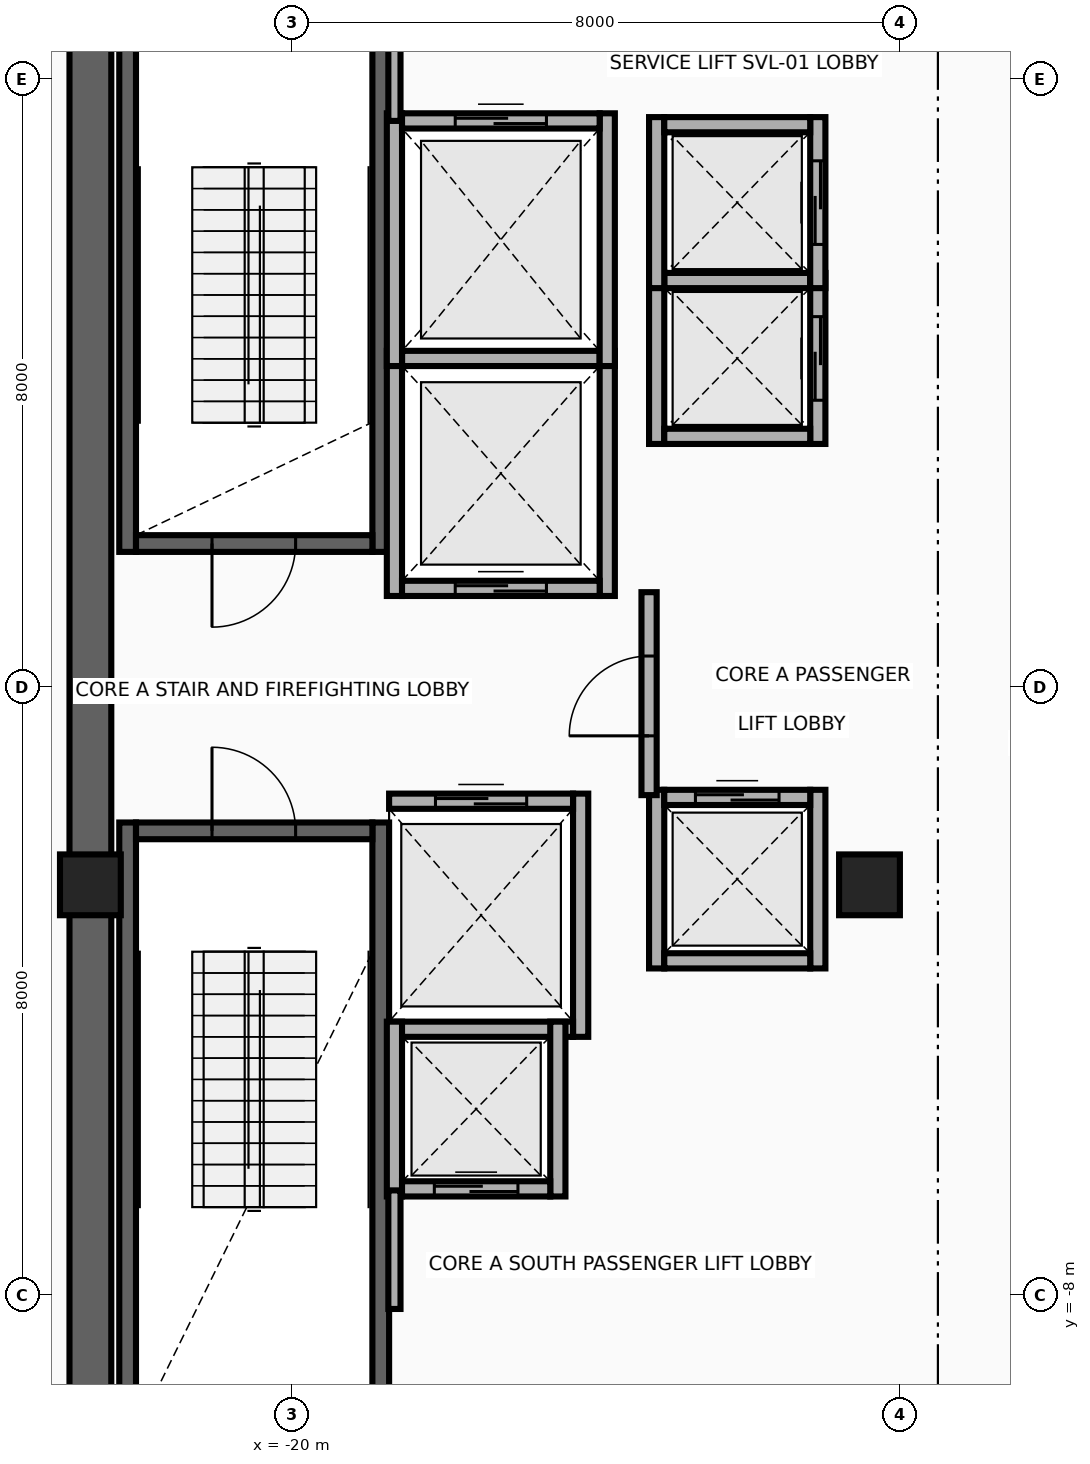
"""IFC4 building model, lengths in metres.
Left out: names, types, materials, properties, quantities, classifications, styles, units other than length and angle.
Written with IfcOpenShell. Run it as: python <this file> out.ifc"""

import sys

from ifc_helpers import new_model, si_unit, direction, frame, frame_2d, origin, origin_2d, place, context, subcontext, project, spatial, rectangle, extrude, source, transform, mapped, element, fill, save


model = new_model("IFC4")
c1 = context("Model", 3, precision=1e-05, world=origin(), true_north=direction((0.0, 1.0)))
c2 = subcontext(c1, "Body", "Model", "MODEL_VIEW")
j1 = project(units=[si_unit("LENGTHUNIT", "METRE"), si_unit("PLANEANGLEUNIT", "RADIAN")], contexts=[c1])
p1 = place(None, origin())
s1 = spatial("IfcSite", under=j1, at=p1, CompositionType="ELEMENT")
p2 = place(p1, origin())
s2 = spatial("IfcBuilding", under=s1, at=p2, CompositionType="ELEMENT")
p3 = place(p2, frame((0.0, 0.0, 261.5)))
s3 = spatial("IfcBuildingStorey", under=s2, at=p3, CompositionType="ELEMENT", Elevation=261.5)
for number, where, z_axis, x_axis in (
    (1, (-22.16, 1.78, 0.0), (0.0, 0.0, 1.0), (0.0, 1.0, 0.0)),
    (2, (-18.83, 1.78, 0.0), (0.0, 0.0, 1.0), (0.0, 1.0, 0.0)),
):
    element("IfcWall", number, at=place(p3, frame(where, z_axis=z_axis, x_axis=x_axis)), inside=s3, PredefinedType="SHEAR", context=c2, shape_type="SweptSolid", body=[
        extrude(rectangle(XDim=8.745, YDim=0.22, at=frame_2d((4.373, 0.0))), origin(), (0.0, 0.0, 1.0), 4.26),
    ])
p4 = place(p3, frame((-22.05, 1.89, 0.0), z_axis=(0.0, 0.0, 1.0), x_axis=(1.0, 0.0, 0.0)))
e3 = element("IfcWall", 3, at=p4, inside=s3, PredefinedType="SHEAR", context=c2, shape_type="SweptSolid", body=[
    extrude(rectangle(XDim=3.11, YDim=0.22, at=frame_2d((1.555, 0.0))), origin(), (0.0, 0.0, 1.0), 4.26),
])
p5 = place(p4, frame((1.0, 0.0, 0.0)))
e4 = element("IfcOpeningElement", 4, at=p5, cuts=e3, PredefinedType="OPENING", context=c2, shape_type="SweptSolid", body=[
    extrude(rectangle(XDim=1.1, YDim=2.15, at=frame_2d((0.55, 1.075))), frame((0.0, 0.125, 0.0), z_axis=(0.0, -1.0, 0.0), x_axis=(1.0, 0.0, 0.0)), (0.0, 0.0, 1.0), 0.25),
])
for number, where, z_axis, x_axis in (
    (5, (-22.16, -10.525, 0.0), (0.0, 0.0, 1.0), (0.0, 1.0, 0.0)),
    (6, (-18.83, -10.525, 0.0), (0.0, 0.0, 1.0), (0.0, 1.0, 0.0)),
):
    element("IfcWall", number, at=place(p3, frame(where, z_axis=z_axis, x_axis=x_axis)), inside=s3, PredefinedType="SHEAR", context=c2, shape_type="SweptSolid", body=[
        extrude(rectangle(XDim=8.745, YDim=0.22, at=frame_2d((4.373, 0.0))), origin(), (0.0, 0.0, 1.0), 4.26),
    ])
p6 = place(p3, frame((-22.05, -1.89, 0.0), z_axis=(0.0, 0.0, 1.0), x_axis=(1.0, 0.0, 0.0)))
e7 = element("IfcWall", 7, at=p6, inside=s3, PredefinedType="SHEAR", context=c2, shape_type="SweptSolid", body=[
    extrude(rectangle(XDim=3.11, YDim=0.22, at=frame_2d((1.555, 0.0))), origin(), (0.0, 0.0, 1.0), 4.26),
])
p7 = place(p6, frame((1.0, 0.0, 0.0)))
e8 = element("IfcOpeningElement", 8, at=p7, cuts=e7, PredefinedType="OPENING", context=c2, shape_type="SweptSolid", body=[
    extrude(rectangle(XDim=1.1, YDim=2.15, at=frame_2d((0.55, 1.075))), frame((0.0, 0.125, 0.0), z_axis=(0.0, -1.0, 0.0), x_axis=(1.0, 0.0, 0.0)), (0.0, 0.0, 1.0), 0.25),
])
p8 = place(p3, frame((-22.65, -11.075, 0.0), z_axis=(0.0, 0.0, 1.0), x_axis=(0.0, 1.0, 0.0)))
e9 = element("IfcWall", 9, at=p8, inside=s3, PredefinedType="SHEAR", context=c2, shape_type="SweptSolid", body=[
    extrude(rectangle(XDim=22.15, YDim=0.55, at=frame_2d((11.075, 0.0))), origin(), (0.0, 0.0, 1.0), 4.26),
])
m1 = source(origin(), c2, "Body", "SweptSolid", [
    extrude(rectangle(XDim=0.8, YDim=0.8, at=origin_2d()), origin(), (0.0, 0.0, 1.0), 4.5),
])
for number, where, z_axis, x_axis in (
    (10, (-22.65, -2.6, 0.0), (0.0, 0.0, 1.0), (1.0, 0.0, 0.0)),
    (11, (-12.4, -2.6, 0.0), (0.0, 0.0, 1.0), (1.0, 0.0, 0.0)),
):
    element("IfcColumn", number, at=place(p3, frame(where, z_axis=z_axis, x_axis=x_axis)), inside=s3, PredefinedType="COLUMN", context=c2, shape_type="MappedRepresentation", body=[
        mapped(m1, transform((0.0, 0.0, 0.0), x_axis=(1.0, 0.0, 0.0), y_axis=(0.0, 1.0, 0.0), z_axis=(0.0, 0.0, 1.0), scale=1.0)),
    ])
for number, where, z_axis, x_axis in (
    (12, (-18.65, 1.2, 0.0), (0.0, 0.0, 1.0), (0.0, 1.0, 0.0)),
    (13, (-15.85, 1.2, 0.0), (0.0, 0.0, 1.0), (0.0, 1.0, 0.0)),
):
    element("IfcWall", number, at=place(p3, frame(where, z_axis=z_axis, x_axis=x_axis)), inside=s3, PredefinedType="MOVABLE", context=c2, shape_type="SweptSolid", body=[
        extrude(rectangle(XDim=3.225, YDim=0.2, at=frame_2d((1.613, 0.0))), origin(), (0.0, 0.0, 1.0), 4.26),
    ])
p9 = place(p3, frame((-18.55, 1.3, 0.0), z_axis=(0.0, 0.0, 1.0), x_axis=(1.0, 0.0, 0.0)))
e14 = element("IfcWall", 14, at=p9, inside=s3, PredefinedType="MOVABLE", context=c2, shape_type="SweptSolid", body=[
    extrude(rectangle(XDim=2.6, YDim=0.2, at=frame_2d((1.3, 0.0))), origin(), (0.0, 0.0, 1.0), 4.26),
])
p10 = place(p9, frame((0.7, 0.0, 0.0)))
e15 = element("IfcOpeningElement", 15, at=p10, cuts=e14, PredefinedType="OPENING", context=c2, shape_type="SweptSolid", body=[
    extrude(rectangle(XDim=1.2, YDim=2.1, at=frame_2d((0.6, 1.05))), frame((0.0, 0.115, 0.0), z_axis=(0.0, -1.0, 0.0), x_axis=(1.0, 0.0, 0.0)), (0.0, 0.0, 1.0), 0.23),
])
p11 = place(p3, frame((-18.55, 4.325, 0.0), z_axis=(0.0, 0.0, 1.0), x_axis=(1.0, 0.0, 0.0)))
e16 = element("IfcWall", 16, at=p11, inside=s3, PredefinedType="MOVABLE", context=c2, shape_type="SweptSolid", body=[
    extrude(rectangle(XDim=2.6, YDim=0.2, at=frame_2d((1.3, 0.0))), origin(), (0.0, 0.0, 1.0), 4.26),
])
p12 = place(p3, frame((-16.2, -4.6, 0.0), z_axis=(0.0, 0.0, 1.0), x_axis=(0.0, 1.0, 0.0)))
e17 = element("IfcWall", 17, at=p12, inside=s3, PredefinedType="MOVABLE", context=c2, shape_type="SweptSolid", body=[
    extrude(rectangle(XDim=3.2, YDim=0.2, at=frame_2d((1.6, 0.0))), origin(), (0.0, 0.0, 1.0), 4.26),
])
p13 = place(p3, frame((-18.72, -4.5, 0.0), z_axis=(0.0, 0.0, 1.0), x_axis=(1.0, 0.0, 0.0)))
e18 = element("IfcWall", 18, at=p13, inside=s3, PredefinedType="MOVABLE", context=c2, shape_type="SweptSolid", body=[
    extrude(rectangle(XDim=2.42, YDim=0.2, at=frame_2d((1.21, 0.0))), origin(), (0.0, 0.0, 1.0), 4.26),
])
p14 = place(p3, frame((-18.72, -1.5, 0.0), z_axis=(0.0, 0.0, 1.0), x_axis=(1.0, 0.0, 0.0)))
e19 = element("IfcWall", 19, at=p14, inside=s3, PredefinedType="MOVABLE", context=c2, shape_type="SweptSolid", body=[
    extrude(rectangle(XDim=2.42, YDim=0.2, at=frame_2d((1.21, 0.0))), origin(), (0.0, 0.0, 1.0), 4.26),
])
p15 = place(p14, frame((0.61, 0.0, 0.0)))
e20 = element("IfcOpeningElement", 20, at=p15, cuts=e19, PredefinedType="OPENING", context=c2, shape_type="SweptSolid", body=[
    extrude(rectangle(XDim=1.2, YDim=2.1, at=frame_2d((0.6, 1.05))), frame((0.0, 0.115, 0.0), z_axis=(0.0, -1.0, 0.0), x_axis=(1.0, 0.0, 0.0)), (0.0, 0.0, 1.0), 0.23),
])
for number, where, z_axis, x_axis in (
    (21, (-18.65, 4.225, 0.0), (0.0, 0.0, 1.0), (0.0, 1.0, 0.0)),
    (22, (-15.85, 4.225, 0.0), (0.0, 0.0, 1.0), (0.0, 1.0, 0.0)),
):
    element("IfcWall", number, at=place(p3, frame(where, z_axis=z_axis, x_axis=x_axis)), inside=s3, PredefinedType="MOVABLE", context=c2, shape_type="SweptSolid", body=[
        extrude(rectangle(XDim=3.325, YDim=0.2, at=frame_2d((1.663, 0.0))), origin(), (0.0, 0.0, 1.0), 4.26),
    ])
p16 = place(p3, frame((-18.55, 7.45, 0.0), z_axis=(0.0, 0.0, 1.0), x_axis=(1.0, 0.0, 0.0)))
e23 = element("IfcWall", 23, at=p16, inside=s3, PredefinedType="MOVABLE", context=c2, shape_type="SweptSolid", body=[
    extrude(rectangle(XDim=2.6, YDim=0.2, at=frame_2d((1.3, 0.0))), origin(), (0.0, 0.0, 1.0), 4.26),
])
p17 = place(p16, frame((0.7, 0.0, 0.0)))
e24 = element("IfcOpeningElement", 24, at=p17, cuts=e23, PredefinedType="OPENING", context=c2, shape_type="SweptSolid", body=[
    extrude(rectangle(XDim=1.2, YDim=2.1, at=frame_2d((0.6, 1.05))), frame((0.0, 0.115, 0.0), z_axis=(0.0, -1.0, 0.0), x_axis=(1.0, 0.0, 0.0)), (0.0, 0.0, 1.0), 0.23),
])
p18 = place(p3, frame((-15.2, 3.2, 0.0), z_axis=(0.0, 0.0, 1.0), x_axis=(0.0, 1.0, 0.0)))
e25 = element("IfcWall", 25, at=p18, inside=s3, PredefinedType="MOVABLE", context=c2, shape_type="SweptSolid", body=[
    extrude(rectangle(XDim=2.25, YDim=0.2, at=frame_2d((1.125, 0.0))), origin(), (0.0, 0.0, 1.0), 4.26),
])
p19 = place(p3, frame((-13.08, 3.2, 0.0), z_axis=(0.0, 0.0, 1.0), x_axis=(0.0, 1.0, 0.0)))
e26 = element("IfcWall", 26, at=p19, inside=s3, PredefinedType="MOVABLE", context=c2, shape_type="SweptSolid", body=[
    extrude(rectangle(XDim=2.25, YDim=0.2, at=frame_2d((1.125, 0.0))), origin(), (0.0, 0.0, 1.0), 4.26),
])
p20 = place(p19, frame((0.575, 0.0, 0.0)))
e27 = element("IfcOpeningElement", 27, at=p20, cuts=e26, PredefinedType="OPENING", context=c2, shape_type="SweptSolid", body=[
    extrude(rectangle(XDim=1.1, YDim=2.1, at=frame_2d((0.55, 1.05))), frame((0.0, 0.115, 0.0), z_axis=(0.0, -1.0, 0.0), x_axis=(1.0, 0.0, 0.0)), (0.0, 0.0, 1.0), 0.23),
])
for number, where, z_axis, x_axis in (
    (28, (-15.1, 3.3, 0.0), (0.0, 0.0, 1.0), (1.0, 0.0, 0.0)),
    (29, (-15.1, 5.35, 0.0), (0.0, 0.0, 1.0), (1.0, 0.0, 0.0)),
):
    element("IfcWall", number, at=place(p3, frame(where, z_axis=z_axis, x_axis=x_axis)), inside=s3, PredefinedType="MOVABLE", context=c2, shape_type="SweptSolid", body=[
        extrude(rectangle(XDim=1.92, YDim=0.2, at=frame_2d((0.96, 0.0))), origin(), (0.0, 0.0, 1.0), 4.26),
    ])
p21 = place(p3, frame((-15.2, 5.25, 0.0), z_axis=(0.0, 0.0, 1.0), x_axis=(0.0, 1.0, 0.0)))
e30 = element("IfcWall", 30, at=p21, inside=s3, PredefinedType="MOVABLE", context=c2, shape_type="SweptSolid", body=[
    extrude(rectangle(XDim=2.25, YDim=0.2, at=frame_2d((1.125, 0.0))), origin(), (0.0, 0.0, 1.0), 4.26),
])
p22 = place(p3, frame((-13.08, 5.25, 0.0), z_axis=(0.0, 0.0, 1.0), x_axis=(0.0, 1.0, 0.0)))
e31 = element("IfcWall", 31, at=p22, inside=s3, PredefinedType="MOVABLE", context=c2, shape_type="SweptSolid", body=[
    extrude(rectangle(XDim=2.25, YDim=0.2, at=frame_2d((1.125, 0.0))), origin(), (0.0, 0.0, 1.0), 4.26),
])
p23 = place(p22, frame((0.575, 0.0, 0.0)))
e32 = element("IfcOpeningElement", 32, at=p23, cuts=e31, PredefinedType="OPENING", context=c2, shape_type="SweptSolid", body=[
    extrude(rectangle(XDim=1.1, YDim=2.1, at=frame_2d((0.55, 1.05))), frame((0.0, 0.115, 0.0), z_axis=(0.0, -1.0, 0.0), x_axis=(1.0, 0.0, 0.0)), (0.0, 0.0, 1.0), 0.23),
])
p24 = place(p3, frame((-15.1, 7.4, 0.0), z_axis=(0.0, 0.0, 1.0), x_axis=(1.0, 0.0, 0.0)))
e33 = element("IfcWall", 33, at=p24, inside=s3, PredefinedType="MOVABLE", context=c2, shape_type="SweptSolid", body=[
    extrude(rectangle(XDim=1.92, YDim=0.2, at=frame_2d((0.96, 0.0))), origin(), (0.0, 0.0, 1.0), 4.26),
])
for number, where, z_axis, x_axis in (
    (34, (-18.65, -6.7, 0.0), (0.0, 0.0, 1.0), (0.0, 1.0, 0.0)),
    (35, (-16.5, -6.7, 0.0), (0.0, 0.0, 1.0), (0.0, 1.0, 0.0)),
):
    element("IfcWall", number, at=place(p3, frame(where, z_axis=z_axis, x_axis=x_axis)), inside=s3, PredefinedType="MOVABLE", context=c2, shape_type="SweptSolid", body=[
        extrude(rectangle(XDim=2.3, YDim=0.2, at=frame_2d((1.15, 0.0))), origin(), (0.0, 0.0, 1.0), 4.26),
    ])
p25 = place(p3, frame((-18.55, -6.6, 0.0), z_axis=(0.0, 0.0, 1.0), x_axis=(1.0, 0.0, 0.0)))
e36 = element("IfcWall", 36, at=p25, inside=s3, PredefinedType="MOVABLE", context=c2, shape_type="SweptSolid", body=[
    extrude(rectangle(XDim=1.95, YDim=0.2, at=frame_2d((0.975, 0.0))), origin(), (0.0, 0.0, 1.0), 4.26),
])
p26 = place(p25, frame((0.425, 0.0, 0.0)))
e37 = element("IfcOpeningElement", 37, at=p26, cuts=e36, PredefinedType="OPENING", context=c2, shape_type="SweptSolid", body=[
    extrude(rectangle(XDim=1.1, YDim=2.1, at=frame_2d((0.55, 1.05))), frame((0.0, 0.115, 0.0), z_axis=(0.0, -1.0, 0.0), x_axis=(1.0, 0.0, 0.0)), (0.0, 0.0, 1.0), 0.23),
])
for number, where, z_axis, x_axis in (
    (38, (-15.2, -3.7, 0.0), (0.0, 0.0, 1.0), (0.0, 1.0, 0.0)),
    (39, (-13.08, -3.7, 0.0), (0.0, 0.0, 1.0), (0.0, 1.0, 0.0)),
):
    element("IfcWall", number, at=place(p3, frame(where, z_axis=z_axis, x_axis=x_axis)), inside=s3, PredefinedType="MOVABLE", context=c2, shape_type="SweptSolid", body=[
        extrude(rectangle(XDim=2.35, YDim=0.2, at=frame_2d((1.175, 0.0))), origin(), (0.0, 0.0, 1.0), 4.26),
    ])
p27 = place(p3, frame((-15.1, -3.6, 0.0), z_axis=(0.0, 0.0, 1.0), x_axis=(1.0, 0.0, 0.0)))
e40 = element("IfcWall", 40, at=p27, inside=s3, PredefinedType="MOVABLE", context=c2, shape_type="SweptSolid", body=[
    extrude(rectangle(XDim=1.92, YDim=0.2, at=frame_2d((0.96, 0.0))), origin(), (0.0, 0.0, 1.0), 4.26),
])
p28 = place(p3, frame((-15.1, -1.45, 0.0), z_axis=(0.0, 0.0, 1.0), x_axis=(1.0, 0.0, 0.0)))
e41 = element("IfcWall", 41, at=p28, inside=s3, PredefinedType="MOVABLE", context=c2, shape_type="SweptSolid", body=[
    extrude(rectangle(XDim=1.92, YDim=0.2, at=frame_2d((0.96, 0.0))), origin(), (0.0, 0.0, 1.0), 4.26),
])
p29 = place(p28, frame((0.41, 0.0, 0.0)))
e42 = element("IfcOpeningElement", 42, at=p29, cuts=e41, PredefinedType="OPENING", context=c2, shape_type="SweptSolid", body=[
    extrude(rectangle(XDim=1.1, YDim=2.1, at=frame_2d((0.55, 1.05))), frame((0.0, 0.115, 0.0), z_axis=(0.0, -1.0, 0.0), x_axis=(1.0, 0.0, 0.0)), (0.0, 0.0, 1.0), 0.23),
])
p30 = place(p3, frame((-15.3, -1.42, 0.0), z_axis=(0.0, 0.0, 1.0), x_axis=(0.0, 1.0, 0.0)))
e43 = element("IfcWall", 43, at=p30, inside=s3, PredefinedType="PARTITIONING", context=c2, shape_type="SweptSolid", body=[
    extrude(rectangle(XDim=2.67, YDim=0.2, at=frame_2d((1.335, 0.0))), origin(), (0.0, 0.0, 1.0), 4.26),
])
p31 = place(p30, frame((0.78, 0.0, 0.0)))
e44 = element("IfcOpeningElement", 44, at=p31, cuts=e43, PredefinedType="OPENING", context=c2, shape_type="SweptSolid", body=[
    extrude(rectangle(XDim=1.05, YDim=2.15, at=frame_2d((0.525, 1.075))), frame((0.0, 0.115, 0.0), z_axis=(0.0, -1.0, 0.0), x_axis=(1.0, 0.0, 0.0)), (0.0, 0.0, 1.0), 0.23),
])
p32 = place(p3, frame((-18.65, 7.45, 0.0), z_axis=(0.0, 0.0, 1.0), x_axis=(0.0, 1.0, 0.0)))
e45 = element("IfcWall", 45, at=p32, inside=s3, PredefinedType="PARTITIONING", context=c2, shape_type="SweptSolid", body=[
    extrude(rectangle(XDim=2.93, YDim=0.16, at=frame_2d((1.465, 0.0))), origin(), (0.0, 0.0, 1.0), 4.26),
])
p33 = place(p3, frame((-18.65, -8.18, 0.0), z_axis=(0.0, 0.0, 1.0), x_axis=(0.0, 1.0, 0.0)))
e46 = element("IfcWall", 46, at=p33, inside=s3, PredefinedType="PARTITIONING", context=c2, shape_type="SweptSolid", body=[
    extrude(rectangle(XDim=1.56, YDim=0.16, at=frame_2d((0.78, 0.0))), origin(), (0.0, 0.0, 1.0), 4.26),
])
p34 = place(p10, origin())
e47 = element("IfcDoor", 47, at=p34, inside=s3, OperationType="DOUBLE_DOOR_SLIDING", PredefinedType="DOOR", context=c2, shape_type="SweptSolid", body=[
    extrude(rectangle(XDim=1.2, YDim=2.1, at=frame_2d((0.6, 1.05))), frame((0.0, 0.025, 0.0), z_axis=(0.0, -1.0, 0.0), x_axis=(1.0, 0.0, 0.0)), (0.0, 0.0, 1.0), 0.05),
])
fill(e15, e47)
p35 = place(p15, origin())
e48 = element("IfcDoor", 48, at=p35, inside=s3, OperationType="DOUBLE_DOOR_SLIDING", PredefinedType="DOOR", context=c2, shape_type="SweptSolid", body=[
    extrude(rectangle(XDim=1.2, YDim=2.1, at=frame_2d((0.6, 1.05))), frame((0.0, 0.025, 0.0), z_axis=(0.0, -1.0, 0.0), x_axis=(1.0, 0.0, 0.0)), (0.0, 0.0, 1.0), 0.05),
])
fill(e20, e48)
p36 = place(p17, origin())
e49 = element("IfcDoor", 49, at=p36, inside=s3, OperationType="DOUBLE_DOOR_SLIDING", PredefinedType="DOOR", context=c2, shape_type="SweptSolid", body=[
    extrude(rectangle(XDim=1.2, YDim=2.1, at=frame_2d((0.6, 1.05))), frame((0.0, 0.025, 0.0), z_axis=(0.0, -1.0, 0.0), x_axis=(1.0, 0.0, 0.0)), (0.0, 0.0, 1.0), 0.05),
])
fill(e24, e49)
p37 = place(p20, origin())
e50 = element("IfcDoor", 50, at=p37, inside=s3, OperationType="DOUBLE_DOOR_SLIDING", PredefinedType="DOOR", context=c2, shape_type="SweptSolid", body=[
    extrude(rectangle(XDim=1.1, YDim=2.1, at=frame_2d((0.55, 1.05))), frame((0.0, 0.025, 0.0), z_axis=(0.0, -1.0, 0.0), x_axis=(1.0, 0.0, 0.0)), (0.0, 0.0, 1.0), 0.05),
])
fill(e27, e50)
p38 = place(p23, origin())
e51 = element("IfcDoor", 51, at=p38, inside=s3, OperationType="DOUBLE_DOOR_SLIDING", PredefinedType="DOOR", context=c2, shape_type="SweptSolid", body=[
    extrude(rectangle(XDim=1.1, YDim=2.1, at=frame_2d((0.55, 1.05))), frame((0.0, 0.025, 0.0), z_axis=(0.0, -1.0, 0.0), x_axis=(1.0, 0.0, 0.0)), (0.0, 0.0, 1.0), 0.05),
])
fill(e32, e51)
p39 = place(p26, origin())
e52 = element("IfcDoor", 52, at=p39, inside=s3, OperationType="DOUBLE_DOOR_SLIDING", PredefinedType="DOOR", context=c2, shape_type="SweptSolid", body=[
    extrude(rectangle(XDim=1.1, YDim=2.1, at=frame_2d((0.55, 1.05))), frame((0.0, 0.025, 0.0), z_axis=(0.0, -1.0, 0.0), x_axis=(1.0, 0.0, 0.0)), (0.0, 0.0, 1.0), 0.05),
])
fill(e37, e52)
p40 = place(p29, origin())
e53 = element("IfcDoor", 53, at=p40, inside=s3, OperationType="DOUBLE_DOOR_SLIDING", PredefinedType="DOOR", context=c2, shape_type="SweptSolid", body=[
    extrude(rectangle(XDim=1.1, YDim=2.1, at=frame_2d((0.55, 1.05))), frame((0.0, 0.025, 0.0), z_axis=(0.0, -1.0, 0.0), x_axis=(1.0, 0.0, 0.0)), (0.0, 0.0, 1.0), 0.05),
])
fill(e42, e53)
p41 = place(p31, origin())
e54 = element("IfcDoor", 54, at=p41, inside=s3, OperationType="SINGLE_SWING_RIGHT", PredefinedType="DOOR", context=c2, shape_type="SweptSolid", body=[
    extrude(rectangle(XDim=1.05, YDim=2.15, at=frame_2d((0.525, 1.075))), frame((0.0, 0.025, 0.0), z_axis=(0.0, -1.0, 0.0), x_axis=(1.0, 0.0, 0.0)), (0.0, 0.0, 1.0), 0.05),
])
fill(e44, e54)
p42 = place(p5, frame((1.1, 0.0, 0.0), z_axis=(0.0, 0.0, 1.0), x_axis=(-1.0, 0.0, 0.0)))
e55 = element("IfcDoor", 55, at=p42, inside=s3, OperationType="SINGLE_SWING_LEFT", PredefinedType="DOOR", context=c2, shape_type="SweptSolid", body=[
    extrude(rectangle(XDim=1.1, YDim=2.15, at=frame_2d((0.55, 1.075))), frame((0.0, 0.025, 0.0), z_axis=(0.0, -1.0, 0.0), x_axis=(1.0, 0.0, 0.0)), (0.0, 0.0, 1.0), 0.05),
])
fill(e4, e55)
p43 = place(p7, origin())
e56 = element("IfcDoor", 56, at=p43, inside=s3, OperationType="SINGLE_SWING_RIGHT", PredefinedType="DOOR", context=c2, shape_type="SweptSolid", body=[
    extrude(rectangle(XDim=1.1, YDim=2.15, at=frame_2d((0.55, 1.075))), frame((0.0, 0.025, 0.0), z_axis=(0.0, -1.0, 0.0), x_axis=(1.0, 0.0, 0.0)), (0.0, 0.0, 1.0), 0.05),
])
fill(e8, e56)
save(model, sys.argv[1])
